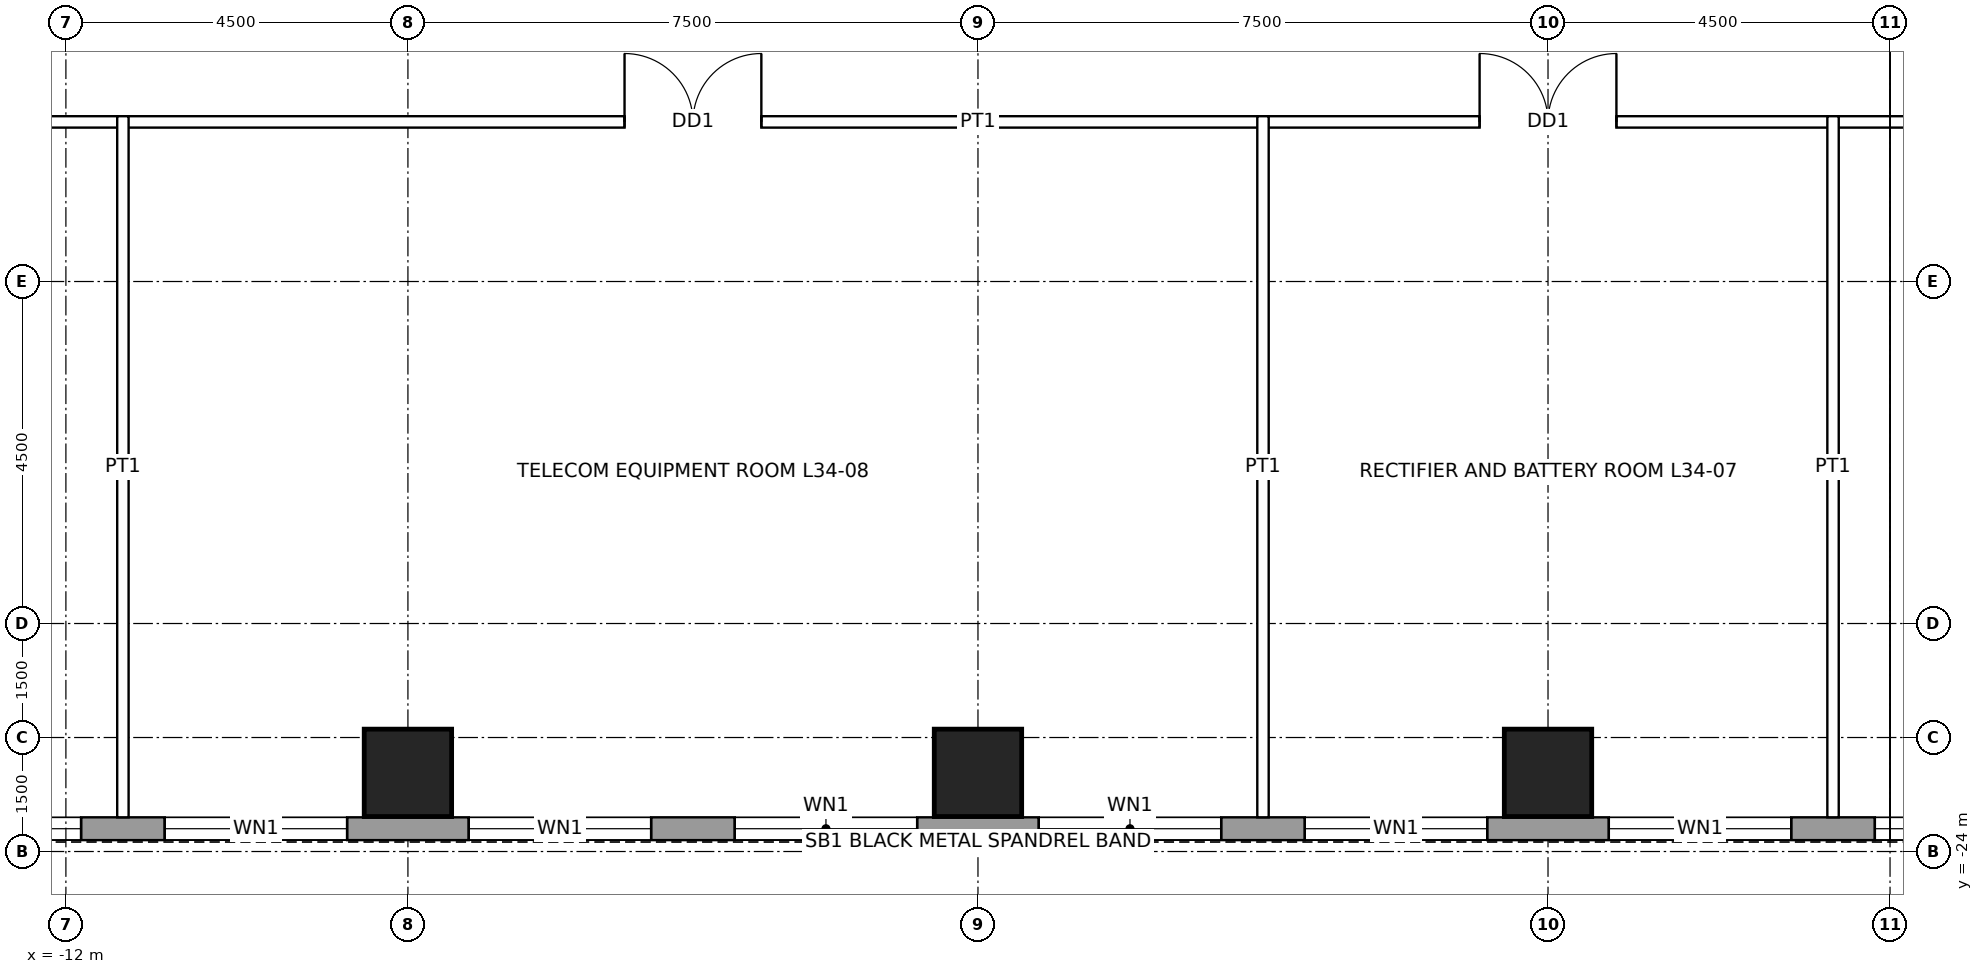
"""IFC4 building model, lengths in metres.
Left out: names, types, materials, properties, quantities, classifications, styles, units other than length and angle.
Written with IfcOpenShell. Run it as: python <this file> out.ifc"""

import sys

from ifc_helpers import new_model, si_unit, direction, frame, frame_2d, origin, origin_2d, place, context, subcontext, project, spatial, rectangle, hollow_rectangle, extrude, element, fill, save


model = new_model("IFC4")
c1 = context("Model", 3, precision=1e-05, world=origin(), true_north=direction((0.0, 1.0)))
c2 = subcontext(c1, "Body", "Model", "MODEL_VIEW")
j1 = project(units=[si_unit("LENGTHUNIT", "METRE"), si_unit("PLANEANGLEUNIT", "RADIAN")], contexts=[c1])
p1 = place(None, origin())
s1 = spatial("IfcSite", under=j1, at=p1, CompositionType="ELEMENT")
p2 = place(p1, origin())
s2 = spatial("IfcBuilding", under=s1, at=p2, CompositionType="ELEMENT")
p3 = place(p2, frame((0.0, 0.0, 167.4)))
s3 = spatial("IfcBuildingStorey", under=s2, at=p3, CompositionType="ELEMENT", Elevation=167.4)
for number, where, z_axis, x_axis in (
    (1, (7.5, -22.965, 0.0), (0.0, 0.0, 1.0), (1.0, 0.0, 0.0)),
    (2, (0.0, -22.965, 0.0), (0.0, 0.0, 1.0), (1.0, 0.0, 0.0)),
    (3, (-7.5, -22.965, 0.0), (0.0, 0.0, 1.0), (1.0, 0.0, 0.0)),
):
    element("IfcColumn", number, at=place(p3, frame(where, z_axis=z_axis, x_axis=x_axis)), inside=s3, PredefinedType="COLUMN", context=c2, shape_type="SweptSolid", body=[
        extrude(hollow_rectangle(XDim=1.15, YDim=1.15, WallThickness=0.075, at=origin_2d()), origin(), (0.0, 0.0, 1.0), 4.5),
    ])
p4 = place(p3, frame((16.2, -23.7, 0.0), z_axis=(0.0, 0.0, 1.0), x_axis=(-1.0, 0.0, 0.0)))
e4 = element("IfcWall", 4, at=p4, inside=s3, PredefinedType="SOLIDWALL", context=c2, shape_type="SweptSolid", body=[
    extrude(rectangle(XDim=32.4, YDim=0.3, at=frame_2d((16.2, 0.0))), origin(), (0.0, 0.0, 1.0), 4.25),
])
p5 = place(p4, frame((2.0, 0.0, 1.0)))
e5 = element("IfcOpeningElement", 5, at=p5, cuts=e4, PredefinedType="OPENING", context=c2, shape_type="SweptSolid", body=[
    extrude(rectangle(XDim=2.4, YDim=1.2, at=frame_2d((1.2, 0.6))), frame((0.0, 0.16, 0.0), z_axis=(0.0, -1.0, 0.0), x_axis=(1.0, 0.0, 0.0)), (0.0, 0.0, 1.0), 0.32),
])
p6 = place(p4, frame((5.5, 0.0, 1.0)))
e6 = element("IfcOpeningElement", 6, at=p6, cuts=e4, PredefinedType="OPENING", context=c2, shape_type="SweptSolid", body=[
    extrude(rectangle(XDim=2.4, YDim=1.2, at=frame_2d((1.2, 0.6))), frame((0.0, 0.16, 0.0), z_axis=(0.0, -1.0, 0.0), x_axis=(1.0, 0.0, 0.0)), (0.0, 0.0, 1.0), 0.32),
])
p7 = place(p4, frame((9.5, 0.0, 1.0)))
e7 = element("IfcOpeningElement", 7, at=p7, cuts=e4, PredefinedType="OPENING", context=c2, shape_type="SweptSolid", body=[
    extrude(rectangle(XDim=2.4, YDim=1.2, at=frame_2d((1.2, 0.6))), frame((0.0, 0.16, 0.0), z_axis=(0.0, -1.0, 0.0), x_axis=(1.0, 0.0, 0.0)), (0.0, 0.0, 1.0), 0.32),
])
p8 = place(p4, frame((13.0, 0.0, 1.0)))
e8 = element("IfcOpeningElement", 8, at=p8, cuts=e4, PredefinedType="OPENING", context=c2, shape_type="SweptSolid", body=[
    extrude(rectangle(XDim=2.4, YDim=1.2, at=frame_2d((1.2, 0.6))), frame((0.0, 0.16, 0.0), z_axis=(0.0, -1.0, 0.0), x_axis=(1.0, 0.0, 0.0)), (0.0, 0.0, 1.0), 0.32),
])
p9 = place(p4, frame((17.0, 0.0, 1.0)))
e9 = element("IfcOpeningElement", 9, at=p9, cuts=e4, PredefinedType="OPENING", context=c2, shape_type="SweptSolid", body=[
    extrude(rectangle(XDim=2.4, YDim=1.2, at=frame_2d((1.2, 0.6))), frame((0.0, 0.16, 0.0), z_axis=(0.0, -1.0, 0.0), x_axis=(1.0, 0.0, 0.0)), (0.0, 0.0, 1.0), 0.32),
])
p10 = place(p4, frame((20.5, 0.0, 1.0)))
e10 = element("IfcOpeningElement", 10, at=p10, cuts=e4, PredefinedType="OPENING", context=c2, shape_type="SweptSolid", body=[
    extrude(rectangle(XDim=2.4, YDim=1.2, at=frame_2d((1.2, 0.6))), frame((0.0, 0.16, 0.0), z_axis=(0.0, -1.0, 0.0), x_axis=(1.0, 0.0, 0.0)), (0.0, 0.0, 1.0), 0.32),
])
p11 = place(p4, frame((24.5, 0.0, 1.0)))
e11 = element("IfcOpeningElement", 11, at=p11, cuts=e4, PredefinedType="OPENING", context=c2, shape_type="SweptSolid", body=[
    extrude(rectangle(XDim=2.4, YDim=1.2, at=frame_2d((1.2, 0.6))), frame((0.0, 0.16, 0.0), z_axis=(0.0, -1.0, 0.0), x_axis=(1.0, 0.0, 0.0)), (0.0, 0.0, 1.0), 0.32),
])
p12 = place(p4, frame((28.0, 0.0, 1.0)))
e12 = element("IfcOpeningElement", 12, at=p12, cuts=e4, PredefinedType="OPENING", context=c2, shape_type="SweptSolid", body=[
    extrude(rectangle(XDim=2.4, YDim=1.2, at=frame_2d((1.2, 0.6))), frame((0.0, 0.16, 0.0), z_axis=(0.0, -1.0, 0.0), x_axis=(1.0, 0.0, 0.0)), (0.0, 0.0, 1.0), 0.32),
])
p13 = place(p3, frame((-14.475, -14.4, 0.0), z_axis=(0.0, 0.0, 1.0), x_axis=(1.0, 0.0, 0.0)))
e13 = element("IfcWall", 13, at=p13, inside=s3, PredefinedType="PARTITIONING", context=c2, shape_type="SweptSolid", body=[
    extrude(rectangle(XDim=28.95, YDim=0.15, at=frame_2d((14.475, 0.0))), origin(), (0.0, 0.0, 1.0), 4.25),
])
p14 = place(p13, frame((21.075, 0.0, 0.0)))
e14 = element("IfcOpeningElement", 14, at=p14, cuts=e13, PredefinedType="OPENING", context=c2, shape_type="SweptSolid", body=[
    extrude(rectangle(XDim=1.8, YDim=2.4, at=frame_2d((0.9, 1.2))), frame((0.0, 0.085, 0.0), z_axis=(0.0, -1.0, 0.0), x_axis=(1.0, 0.0, 0.0)), (0.0, 0.0, 1.0), 0.17),
])
p15 = place(p13, frame((9.825, 0.0, 0.0)))
e15 = element("IfcOpeningElement", 15, at=p15, cuts=e13, PredefinedType="OPENING", context=c2, shape_type="SweptSolid", body=[
    extrude(rectangle(XDim=1.8, YDim=2.4, at=frame_2d((0.9, 1.2))), frame((0.0, 0.085, 0.0), z_axis=(0.0, -1.0, 0.0), x_axis=(1.0, 0.0, 0.0)), (0.0, 0.0, 1.0), 0.17),
])
p16 = place(p13, frame((26.8, 0.0, 0.0)))
e16 = element("IfcOpeningElement", 16, at=p16, cuts=e13, PredefinedType="OPENING", context=c2, shape_type="SweptSolid", body=[
    extrude(rectangle(XDim=1.0, YDim=2.1, at=frame_2d((0.5, 1.05))), frame((0.0, 0.085, 0.0), z_axis=(0.0, -1.0, 0.0), x_axis=(1.0, 0.0, 0.0)), (0.0, 0.0, 1.0), 0.17),
])
p17 = place(p13, frame((1.15, 0.0, 0.0)))
e17 = element("IfcOpeningElement", 17, at=p17, cuts=e13, PredefinedType="OPENING", context=c2, shape_type="SweptSolid", body=[
    extrude(rectangle(XDim=1.0, YDim=2.1, at=frame_2d((0.5, 1.05))), frame((0.0, 0.085, 0.0), z_axis=(0.0, -1.0, 0.0), x_axis=(1.0, 0.0, 0.0)), (0.0, 0.0, 1.0), 0.17),
])
for number, where, z_axis, x_axis in (
    (18, (-11.25, -23.55, 0.0), (0.0, 0.0, 1.0), (0.0, 1.0, 0.0)),
    (19, (3.75, -23.55, 0.0), (0.0, 0.0, 1.0), (0.0, 1.0, 0.0)),
    (20, (11.25, -23.55, 0.0), (0.0, 0.0, 1.0), (0.0, 1.0, 0.0)),
):
    element("IfcWall", number, at=place(p3, frame(where, z_axis=z_axis, x_axis=x_axis)), inside=s3, PredefinedType="PARTITIONING", context=c2, shape_type="SweptSolid", body=[
        extrude(rectangle(XDim=9.225, YDim=0.15, at=frame_2d((4.613, 0.0))), origin(), (0.0, 0.0, 1.0), 3.409),
    ])
p18 = place(p5, origin())
e21 = element("IfcWindow", 21, at=p18, inside=s3, PartitioningType="SINGLE_PANEL", PredefinedType="WINDOW", context=c2, shape_type="SweptSolid", body=[
    extrude(rectangle(XDim=2.4, YDim=1.2, at=frame_2d((1.2, 0.6))), frame((0.0, 0.03, 0.0), z_axis=(0.0, -1.0, 0.0), x_axis=(1.0, 0.0, 0.0)), (0.0, 0.0, 1.0), 0.06),
])
fill(e5, e21)
p19 = place(p6, origin())
e22 = element("IfcWindow", 22, at=p19, inside=s3, PartitioningType="SINGLE_PANEL", PredefinedType="WINDOW", context=c2, shape_type="SweptSolid", body=[
    extrude(rectangle(XDim=2.4, YDim=1.2, at=frame_2d((1.2, 0.6))), frame((0.0, 0.03, 0.0), z_axis=(0.0, -1.0, 0.0), x_axis=(1.0, 0.0, 0.0)), (0.0, 0.0, 1.0), 0.06),
])
fill(e6, e22)
p20 = place(p7, origin())
e23 = element("IfcWindow", 23, at=p20, inside=s3, PartitioningType="SINGLE_PANEL", PredefinedType="WINDOW", context=c2, shape_type="SweptSolid", body=[
    extrude(rectangle(XDim=2.4, YDim=1.2, at=frame_2d((1.2, 0.6))), frame((0.0, 0.03, 0.0), z_axis=(0.0, -1.0, 0.0), x_axis=(1.0, 0.0, 0.0)), (0.0, 0.0, 1.0), 0.06),
])
fill(e7, e23)
p21 = place(p8, origin())
e24 = element("IfcWindow", 24, at=p21, inside=s3, PartitioningType="SINGLE_PANEL", PredefinedType="WINDOW", context=c2, shape_type="SweptSolid", body=[
    extrude(rectangle(XDim=2.4, YDim=1.2, at=frame_2d((1.2, 0.6))), frame((0.0, 0.03, 0.0), z_axis=(0.0, -1.0, 0.0), x_axis=(1.0, 0.0, 0.0)), (0.0, 0.0, 1.0), 0.06),
])
fill(e8, e24)
p22 = place(p9, origin())
e25 = element("IfcWindow", 25, at=p22, inside=s3, PartitioningType="SINGLE_PANEL", PredefinedType="WINDOW", context=c2, shape_type="SweptSolid", body=[
    extrude(rectangle(XDim=2.4, YDim=1.2, at=frame_2d((1.2, 0.6))), frame((0.0, 0.03, 0.0), z_axis=(0.0, -1.0, 0.0), x_axis=(1.0, 0.0, 0.0)), (0.0, 0.0, 1.0), 0.06),
])
fill(e9, e25)
p23 = place(p10, origin())
e26 = element("IfcWindow", 26, at=p23, inside=s3, PartitioningType="SINGLE_PANEL", PredefinedType="WINDOW", context=c2, shape_type="SweptSolid", body=[
    extrude(rectangle(XDim=2.4, YDim=1.2, at=frame_2d((1.2, 0.6))), frame((0.0, 0.03, 0.0), z_axis=(0.0, -1.0, 0.0), x_axis=(1.0, 0.0, 0.0)), (0.0, 0.0, 1.0), 0.06),
])
fill(e10, e26)
p24 = place(p11, origin())
e27 = element("IfcWindow", 27, at=p24, inside=s3, PartitioningType="SINGLE_PANEL", PredefinedType="WINDOW", context=c2, shape_type="SweptSolid", body=[
    extrude(rectangle(XDim=2.4, YDim=1.2, at=frame_2d((1.2, 0.6))), frame((0.0, 0.03, 0.0), z_axis=(0.0, -1.0, 0.0), x_axis=(1.0, 0.0, 0.0)), (0.0, 0.0, 1.0), 0.06),
])
fill(e11, e27)
p25 = place(p12, origin())
e28 = element("IfcWindow", 28, at=p25, inside=s3, PartitioningType="SINGLE_PANEL", PredefinedType="WINDOW", context=c2, shape_type="SweptSolid", body=[
    extrude(rectangle(XDim=2.4, YDim=1.2, at=frame_2d((1.2, 0.6))), frame((0.0, 0.03, 0.0), z_axis=(0.0, -1.0, 0.0), x_axis=(1.0, 0.0, 0.0)), (0.0, 0.0, 1.0), 0.06),
])
fill(e12, e28)
p26 = place(p14, origin())
e29 = element("IfcDoor", 29, at=p26, inside=s3, OperationType="DOUBLE_DOOR_SINGLE_SWING", PredefinedType="DOOR", context=c2, shape_type="SweptSolid", body=[
    extrude(rectangle(XDim=1.8, YDim=2.4, at=frame_2d((0.9, 1.2))), frame((0.0, 0.025, 0.0), z_axis=(0.0, -1.0, 0.0), x_axis=(1.0, 0.0, 0.0)), (0.0, 0.0, 1.0), 0.05),
])
fill(e14, e29)
p27 = place(p15, origin())
e30 = element("IfcDoor", 30, at=p27, inside=s3, OperationType="DOUBLE_DOOR_SINGLE_SWING", PredefinedType="DOOR", context=c2, shape_type="SweptSolid", body=[
    extrude(rectangle(XDim=1.8, YDim=2.4, at=frame_2d((0.9, 1.2))), frame((0.0, 0.025, 0.0), z_axis=(0.0, -1.0, 0.0), x_axis=(1.0, 0.0, 0.0)), (0.0, 0.0, 1.0), 0.05),
])
fill(e15, e30)
save(model, sys.argv[1])
